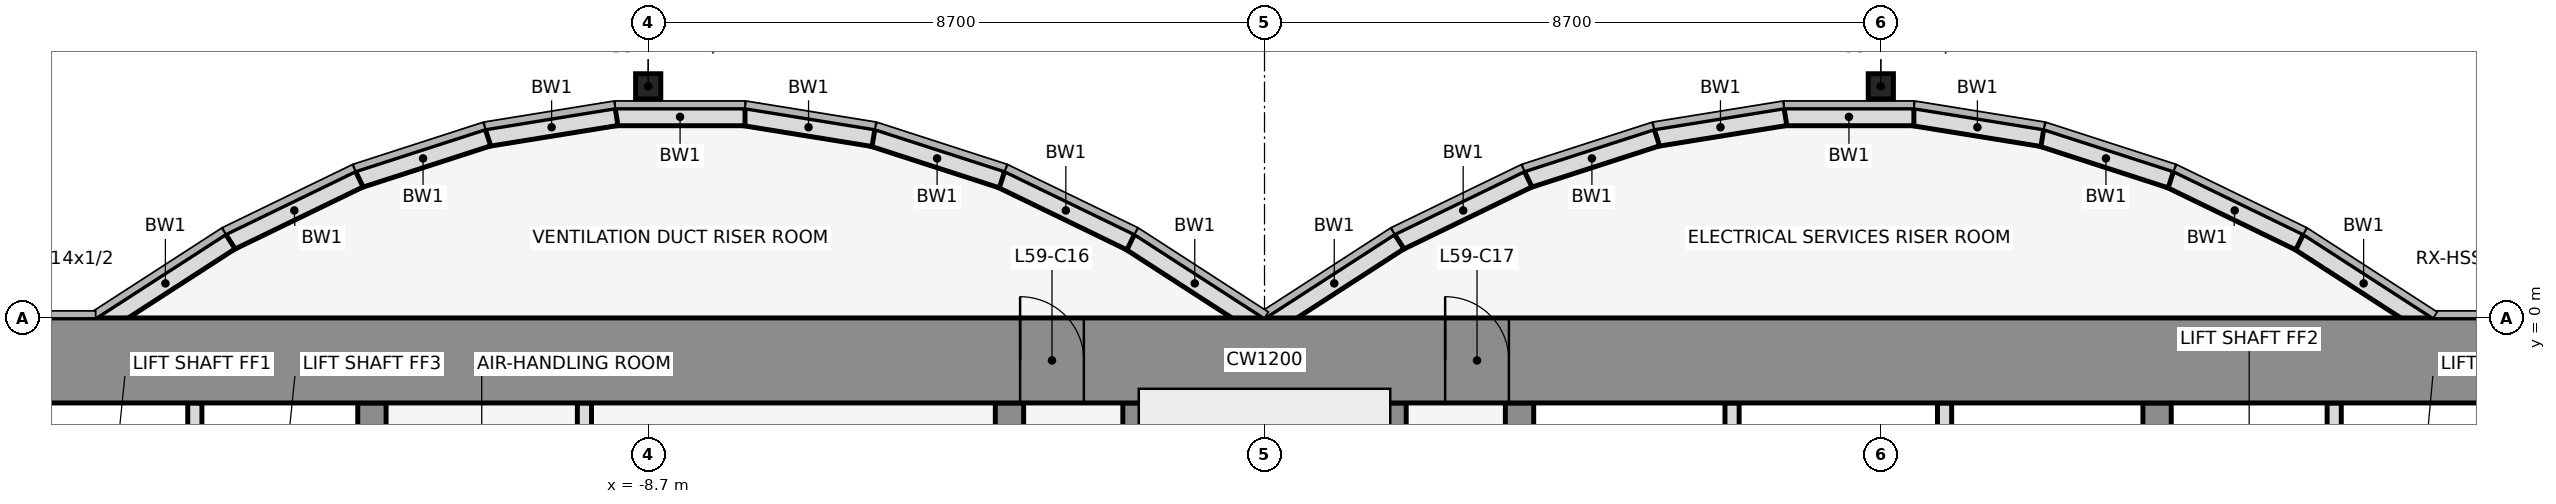
"""IFC4 building model, lengths in metres.
Left out: names, types, materials, properties, quantities, classifications, styles, units other than length and angle.
Written with IfcOpenShell. Run it as: python <this file> out.ifc"""

import sys

from ifc_helpers import new_model, si_unit, direction, frame, frame_2d, origin, origin_2d, place, context, subcontext, project, spatial, rectangle, hollow_rectangle, extrude, element, fill, save


model = new_model("IFC4")
c1 = context("Model", 3, precision=1e-05, world=origin(), true_north=direction((0.0, 1.0)))
c2 = subcontext(c1, "Body", "Model", "MODEL_VIEW")
j1 = project(units=[si_unit("LENGTHUNIT", "METRE"), si_unit("PLANEANGLEUNIT", "RADIAN")], contexts=[c1])
p1 = place(None, origin())
s1 = spatial("IfcSite", under=j1, at=p1, CompositionType="ELEMENT")
p2 = place(p1, origin())
s2 = spatial("IfcBuilding", under=s1, at=p2, CompositionType="ELEMENT")
p3 = place(p2, frame((0.0, 0.0, 262.4)))
s3 = spatial("IfcBuildingStorey", under=s2, at=p3, CompositionType="ELEMENT", Elevation=262.4)
for number, where, z_axis, x_axis in (
    (1, (-8.7, 3.269, 0.0), (0.0, 0.0, 1.0), (1.0, 0.0, 0.0)),
    (2, (8.7, 3.269, 0.0), (0.0, 0.0, 1.0), (1.0, 0.0, 0.0)),
):
    element("IfcColumn", number, at=place(p3, frame(where, z_axis=z_axis, x_axis=x_axis)), inside=s3, PredefinedType="COLUMN", context=c2, shape_type="SweptSolid", body=[
        extrude(hollow_rectangle(XDim=0.356, YDim=0.356, WallThickness=0.012, at=origin_2d()), origin(), (0.0, 0.0, 1.0), 4.2),
    ])
p4 = place(p3, frame((16.432, -0.105, 0.0), z_axis=(0.0, 0.0, 1.0), x_axis=(-0.83981312244, 0.542875602121, 0.0)))
e3 = element("IfcWall", 3, at=p4, inside=s3, PredefinedType="STANDARD", context=c2, shape_type="SweptSolid", body=[
    extrude(rectangle(XDim=2.183, YDim=0.25, at=frame_2d((1.091, 0.0))), origin(), (0.0, 0.0, 1.0), 4.05),
])
p5 = place(p3, frame((14.612, 1.073, 0.0), z_axis=(0.0, 0.0, 1.0), x_axis=(-0.89982408427, 0.436252928206, 0.0)))
e4 = element("IfcWall", 4, at=p5, inside=s3, PredefinedType="STANDARD", context=c2, shape_type="SweptSolid", body=[
    extrude(rectangle(XDim=2.038, YDim=0.25, at=frame_2d((1.019, 0.0))), origin(), (0.0, 0.0, 1.0), 4.05),
])
p6 = place(p3, frame((12.795, 1.955, 0.0), z_axis=(0.0, 0.0, 1.0), x_axis=(-0.951495806175, 0.307661714928, 0.0)))
e5 = element("IfcWall", 5, at=p6, inside=s3, PredefinedType="STANDARD", context=c2, shape_type="SweptSolid", body=[
    extrude(rectangle(XDim=1.927, YDim=0.25, at=frame_2d((0.963, 0.0))), origin(), (0.0, 0.0, 1.0), 4.05),
])
p7 = place(p3, frame((10.98, 2.543, 0.0), z_axis=(0.0, 0.0, 1.0), x_axis=(-0.987181718931, 0.159600293885, 0.0)))
e6 = element("IfcWall", 6, at=p7, inside=s3, PredefinedType="STANDARD", context=c2, shape_type="SweptSolid", body=[
    extrude(rectangle(XDim=1.857, YDim=0.25, at=frame_2d((0.929, 0.0))), origin(), (0.0, 0.0, 1.0), 4.05),
])
p8 = place(p3, frame((9.167, 2.838, 0.0), z_axis=(0.0, 0.0, 1.0), x_axis=(-1.0, 0.0, 0.0)))
e7 = element("IfcWall", 7, at=p8, inside=s3, PredefinedType="STANDARD", context=c2, shape_type="SweptSolid", body=[
    extrude(rectangle(XDim=1.833, YDim=0.25, at=frame_2d((0.917, 0.0))), origin(), (0.0, 0.0, 1.0), 4.05),
])
p9 = place(p3, frame((7.353, 2.84, 0.0), z_axis=(0.0, 0.0, 1.0), x_axis=(-0.987181718931, -0.159600293885, 0.0)))
e8 = element("IfcWall", 8, at=p9, inside=s3, PredefinedType="STANDARD", context=c2, shape_type="SweptSolid", body=[
    extrude(rectangle(XDim=1.857, YDim=0.25, at=frame_2d((0.929, 0.0))), origin(), (0.0, 0.0, 1.0), 4.05),
])
p10 = place(p3, frame((5.538, 2.548, 0.0), z_axis=(0.0, 0.0, 1.0), x_axis=(-0.951495806175, -0.307661714928, 0.0)))
e9 = element("IfcWall", 9, at=p10, inside=s3, PredefinedType="STANDARD", context=c2, shape_type="SweptSolid", body=[
    extrude(rectangle(XDim=1.927, YDim=0.25, at=frame_2d((0.963, 0.0))), origin(), (0.0, 0.0, 1.0), 4.05),
])
p11 = place(p3, frame((3.721, 1.962, 0.0), z_axis=(0.0, 0.0, 1.0), x_axis=(-0.89982408427, -0.436252928206, 0.0)))
e10 = element("IfcWall", 10, at=p11, inside=s3, PredefinedType="STANDARD", context=c2, shape_type="SweptSolid", body=[
    extrude(rectangle(XDim=2.038, YDim=0.25, at=frame_2d((1.019, 0.0))), origin(), (0.0, 0.0, 1.0), 4.05),
])
for number, where, z_axis, x_axis in (
    (11, (1.901, 1.08, 0.0), (0.0, 0.0, 1.0), (-0.84, -0.543, 0.0)),
    (12, (-0.068, -0.105, 0.0), (0.0, 0.0, 1.0), (-0.84, 0.543, 0.0)),
):
    element("IfcWall", number, at=place(p3, frame(where, z_axis=z_axis, x_axis=x_axis)), inside=s3, PredefinedType="STANDARD", context=c2, shape_type="SweptSolid", body=[
        extrude(rectangle(XDim=2.183, YDim=0.25, at=frame_2d((1.091, 0.0))), origin(), (0.0, 0.0, 1.0), 4.05),
    ])
p12 = place(p3, frame((-1.888, 1.073, 0.0), z_axis=(0.0, 0.0, 1.0), x_axis=(-0.89982408427, 0.436252928206, 0.0)))
e13 = element("IfcWall", 13, at=p12, inside=s3, PredefinedType="STANDARD", context=c2, shape_type="SweptSolid", body=[
    extrude(rectangle(XDim=2.038, YDim=0.25, at=frame_2d((1.019, 0.0))), origin(), (0.0, 0.0, 1.0), 4.05),
])
p13 = place(p3, frame((-3.705, 1.955, 0.0), z_axis=(0.0, 0.0, 1.0), x_axis=(-0.951495806175, 0.307661714928, 0.0)))
e14 = element("IfcWall", 14, at=p13, inside=s3, PredefinedType="STANDARD", context=c2, shape_type="SweptSolid", body=[
    extrude(rectangle(XDim=1.927, YDim=0.25, at=frame_2d((0.963, 0.0))), origin(), (0.0, 0.0, 1.0), 4.05),
])
p14 = place(p3, frame((-5.52, 2.543, 0.0), z_axis=(0.0, 0.0, 1.0), x_axis=(-0.987181718931, 0.159600293885, 0.0)))
e15 = element("IfcWall", 15, at=p14, inside=s3, PredefinedType="STANDARD", context=c2, shape_type="SweptSolid", body=[
    extrude(rectangle(XDim=1.857, YDim=0.25, at=frame_2d((0.929, 0.0))), origin(), (0.0, 0.0, 1.0), 4.05),
])
p15 = place(p3, frame((-7.333, 2.838, 0.0), z_axis=(0.0, 0.0, 1.0), x_axis=(-1.0, 0.0, 0.0)))
e16 = element("IfcWall", 16, at=p15, inside=s3, PredefinedType="STANDARD", context=c2, shape_type="SweptSolid", body=[
    extrude(rectangle(XDim=1.833, YDim=0.25, at=frame_2d((0.917, 0.0))), origin(), (0.0, 0.0, 1.0), 4.05),
])
p16 = place(p3, frame((-9.147, 2.84, 0.0), z_axis=(0.0, 0.0, 1.0), x_axis=(-0.987181718931, -0.159600293885, 0.0)))
e17 = element("IfcWall", 17, at=p16, inside=s3, PredefinedType="STANDARD", context=c2, shape_type="SweptSolid", body=[
    extrude(rectangle(XDim=1.857, YDim=0.25, at=frame_2d((0.929, 0.0))), origin(), (0.0, 0.0, 1.0), 4.05),
])
p17 = place(p3, frame((-10.962, 2.548, 0.0), z_axis=(0.0, 0.0, 1.0), x_axis=(-0.951495806175, -0.307661714928, 0.0)))
e18 = element("IfcWall", 18, at=p17, inside=s3, PredefinedType="STANDARD", context=c2, shape_type="SweptSolid", body=[
    extrude(rectangle(XDim=1.927, YDim=0.25, at=frame_2d((0.963, 0.0))), origin(), (0.0, 0.0, 1.0), 4.05),
])
p18 = place(p3, frame((-12.779, 1.962, 0.0), z_axis=(0.0, 0.0, 1.0), x_axis=(-0.89982408427, -0.436252928206, 0.0)))
e19 = element("IfcWall", 19, at=p18, inside=s3, PredefinedType="STANDARD", context=c2, shape_type="SweptSolid", body=[
    extrude(rectangle(XDim=2.038, YDim=0.25, at=frame_2d((1.019, 0.0))), origin(), (0.0, 0.0, 1.0), 4.05),
])
p19 = place(p3, frame((-14.599, 1.08, 0.0), z_axis=(0.0, 0.0, 1.0), x_axis=(-0.83981312244, -0.542875602121, 0.0)))
e20 = element("IfcWall", 20, at=p19, inside=s3, PredefinedType="STANDARD", context=c2, shape_type="SweptSolid", body=[
    extrude(rectangle(XDim=2.183, YDim=0.25, at=frame_2d((1.091, 0.0))), origin(), (0.0, 0.0, 1.0), 4.05),
])
p20 = place(p3, frame((-15.1, -4.6, 0.0), z_axis=(0.0, 0.0, 1.0), x_axis=(0.0, 1.0, 0.0)))
e21 = element("IfcWall", 21, at=p20, inside=s3, PredefinedType="PARTITIONING", context=c2, shape_type="SweptSolid", body=[
    extrude(rectangle(XDim=3.4, YDim=0.2, at=frame_2d((1.7, 0.0))), origin(), (0.0, 0.0, 1.0), 3.118),
])
p21 = place(p3, frame((-12.6, -11.8, 0.0), z_axis=(0.0, 0.0, 1.0), x_axis=(0.0, 1.0, 0.0)))
e22 = element("IfcWall", 22, at=p21, inside=s3, PredefinedType="SHEAR", context=c2, shape_type="SweptSolid", body=[
    extrude(rectangle(XDim=10.6, YDim=0.4, at=frame_2d((5.3, 0.0))), origin(), (0.0, 0.0, 1.0), 4.2),
])
p22 = place(p21, frame((4.75, 0.0, 0.0)))
e23 = element("IfcOpeningElement", 23, at=p22, cuts=e22, PredefinedType="OPENING", context=c2, shape_type="SweptSolid", body=[
    extrude(rectangle(XDim=1.1, YDim=2.1, at=frame_2d((0.55, 1.05))), frame((0.0, 0.212, 0.0), z_axis=(0.0, -1.0, 0.0), x_axis=(1.0, 0.0, 0.0)), (0.0, 0.0, 1.0), 0.424),
])
p23 = place(p3, frame((-9.6, -4.6, 0.0), z_axis=(0.0, 0.0, 1.0), x_axis=(0.0, 1.0, 0.0)))
e24 = element("IfcWall", 24, at=p23, inside=s3, PredefinedType="PARTITIONING", context=c2, shape_type="SweptSolid", body=[
    extrude(rectangle(XDim=3.4, YDim=0.2, at=frame_2d((1.7, 0.0))), origin(), (0.0, 0.0, 1.0), 3.118),
])
p24 = place(p3, frame((-3.6, -11.8, 0.0), z_axis=(0.0, 0.0, 1.0), x_axis=(0.0, 1.0, 0.0)))
e25 = element("IfcWall", 25, at=p24, inside=s3, PredefinedType="SHEAR", context=c2, shape_type="SweptSolid", body=[
    extrude(rectangle(XDim=10.6, YDim=0.4, at=frame_2d((5.3, 0.0))), origin(), (0.0, 0.0, 1.0), 4.2),
])
p25 = place(p24, frame((4.85, 0.0, 0.0)))
e26 = element("IfcOpeningElement", 26, at=p25, cuts=e25, PredefinedType="OPENING", context=c2, shape_type="SweptSolid", body=[
    extrude(rectangle(XDim=0.9, YDim=2.1, at=frame_2d((0.45, 1.05))), frame((0.0, 0.212, 0.0), z_axis=(0.0, -1.0, 0.0), x_axis=(1.0, 0.0, 0.0)), (0.0, 0.0, 1.0), 0.424),
])
for number, where, z_axis, x_axis in (
    (27, (-1.8, -11.8, 0.0), (0.0, 0.0, 1.0), (0.0, 1.0, 0.0)),
    (28, (1.8, -11.8, 0.0), (0.0, 0.0, 1.0), (0.0, 1.0, 0.0)),
):
    element("IfcWall", number, at=place(p3, frame(where, z_axis=z_axis, x_axis=x_axis)), inside=s3, PredefinedType="SHEAR", context=c2, shape_type="SweptSolid", body=[
        extrude(rectangle(XDim=10.6, YDim=0.4, at=frame_2d((5.3, 0.0))), origin(), (0.0, 0.0, 1.0), 4.2),
    ])
p26 = place(p3, frame((3.6, -11.8, 0.0), z_axis=(0.0, 0.0, 1.0), x_axis=(0.0, 1.0, 0.0)))
e29 = element("IfcWall", 29, at=p26, inside=s3, PredefinedType="SHEAR", context=c2, shape_type="SweptSolid", body=[
    extrude(rectangle(XDim=10.6, YDim=0.4, at=frame_2d((5.3, 0.0))), origin(), (0.0, 0.0, 1.0), 4.2),
])
p27 = place(p26, frame((1.35, 0.0, 0.0)))
e30 = element("IfcOpeningElement", 30, at=p27, cuts=e29, PredefinedType="OPENING", context=c2, shape_type="SweptSolid", body=[
    extrude(rectangle(XDim=0.9, YDim=2.1, at=frame_2d((0.45, 1.05))), frame((0.0, 0.212, 0.0), z_axis=(0.0, -1.0, 0.0), x_axis=(1.0, 0.0, 0.0)), (0.0, 0.0, 1.0), 0.424),
])
for number, where, z_axis, x_axis in (
    (31, (6.6, -4.6, 0.0), (0.0, 0.0, 1.0), (0.0, 1.0, 0.0)),
    (32, (9.6, -4.6, 0.0), (0.0, 0.0, 1.0), (0.0, 1.0, 0.0)),
):
    element("IfcWall", number, at=place(p3, frame(where, z_axis=z_axis, x_axis=x_axis)), inside=s3, PredefinedType="PARTITIONING", context=c2, shape_type="SweptSolid", body=[
        extrude(rectangle(XDim=3.4, YDim=0.2, at=frame_2d((1.7, 0.0))), origin(), (0.0, 0.0, 1.0), 3.118),
    ])
p28 = place(p3, frame((12.6, -11.8, 0.0), z_axis=(0.0, 0.0, 1.0), x_axis=(0.0, 1.0, 0.0)))
e33 = element("IfcWall", 33, at=p28, inside=s3, PredefinedType="SHEAR", context=c2, shape_type="SweptSolid", body=[
    extrude(rectangle(XDim=10.6, YDim=0.4, at=frame_2d((5.3, 0.0))), origin(), (0.0, 0.0, 1.0), 4.2),
])
p29 = place(p28, frame((4.75, 0.0, 0.0)))
e34 = element("IfcOpeningElement", 34, at=p29, cuts=e33, PredefinedType="OPENING", context=c2, shape_type="SweptSolid", body=[
    extrude(rectangle(XDim=1.1, YDim=2.1, at=frame_2d((0.55, 1.05))), frame((0.0, 0.212, 0.0), z_axis=(0.0, -1.0, 0.0), x_axis=(1.0, 0.0, 0.0)), (0.0, 0.0, 1.0), 0.424),
])
p30 = place(p3, frame((15.1, -4.6, 0.0), z_axis=(0.0, 0.0, 1.0), x_axis=(0.0, 1.0, 0.0)))
e35 = element("IfcWall", 35, at=p30, inside=s3, PredefinedType="PARTITIONING", context=c2, shape_type="SweptSolid", body=[
    extrude(rectangle(XDim=3.4, YDim=0.2, at=frame_2d((1.7, 0.0))), origin(), (0.0, 0.0, 1.0), 3.118),
])
p31 = place(p3, frame((-22.0, -0.6, 0.0), z_axis=(0.0, 0.0, 1.0), x_axis=(1.0, 0.0, 0.0)))
e36 = element("IfcWall", 36, at=p31, inside=s3, PredefinedType="SHEAR", context=c2, shape_type="SweptSolid", body=[
    extrude(rectangle(XDim=44.0, YDim=1.2, at=frame_2d((22.0, 0.0))), origin(), (0.0, 0.0, 1.0), 4.2),
])
p32 = place(p31, frame((18.55, 0.0, 0.0)))
e37 = element("IfcOpeningElement", 37, at=p32, cuts=e36, PredefinedType="OPENING", context=c2, shape_type="SweptSolid", body=[
    extrude(rectangle(XDim=0.9, YDim=2.1, at=frame_2d((0.45, 1.05))), frame((0.0, 0.612, 0.0), z_axis=(0.0, -1.0, 0.0), x_axis=(1.0, 0.0, 0.0)), (0.0, 0.0, 1.0), 1.224),
])
p33 = place(p31, frame((24.55, 0.0, 0.0)))
e38 = element("IfcOpeningElement", 38, at=p33, cuts=e36, PredefinedType="OPENING", context=c2, shape_type="SweptSolid", body=[
    extrude(rectangle(XDim=0.9, YDim=2.1, at=frame_2d((0.45, 1.05))), frame((0.0, 0.612, 0.0), z_axis=(0.0, -1.0, 0.0), x_axis=(1.0, 0.0, 0.0)), (0.0, 0.0, 1.0), 1.224),
])
p34 = place(p32, origin())
e39 = element("IfcDoor", 39, at=p34, inside=s3, OperationType="SINGLE_SWING_LEFT", PredefinedType="DOOR", context=c2, shape_type="SweptSolid", body=[
    extrude(rectangle(XDim=0.9, YDim=2.1, at=frame_2d((0.45, 1.05))), frame((0.0, 0.025, 0.0), z_axis=(0.0, -1.0, 0.0), x_axis=(1.0, 0.0, 0.0)), (0.0, 0.0, 1.0), 0.05),
])
fill(e37, e39)
p35 = place(p33, origin())
e40 = element("IfcDoor", 40, at=p35, inside=s3, OperationType="SINGLE_SWING_LEFT", PredefinedType="DOOR", context=c2, shape_type="SweptSolid", body=[
    extrude(rectangle(XDim=0.9, YDim=2.1, at=frame_2d((0.45, 1.05))), frame((0.0, 0.025, 0.0), z_axis=(0.0, -1.0, 0.0), x_axis=(1.0, 0.0, 0.0)), (0.0, 0.0, 1.0), 0.05),
])
fill(e38, e40)
save(model, sys.argv[1])
